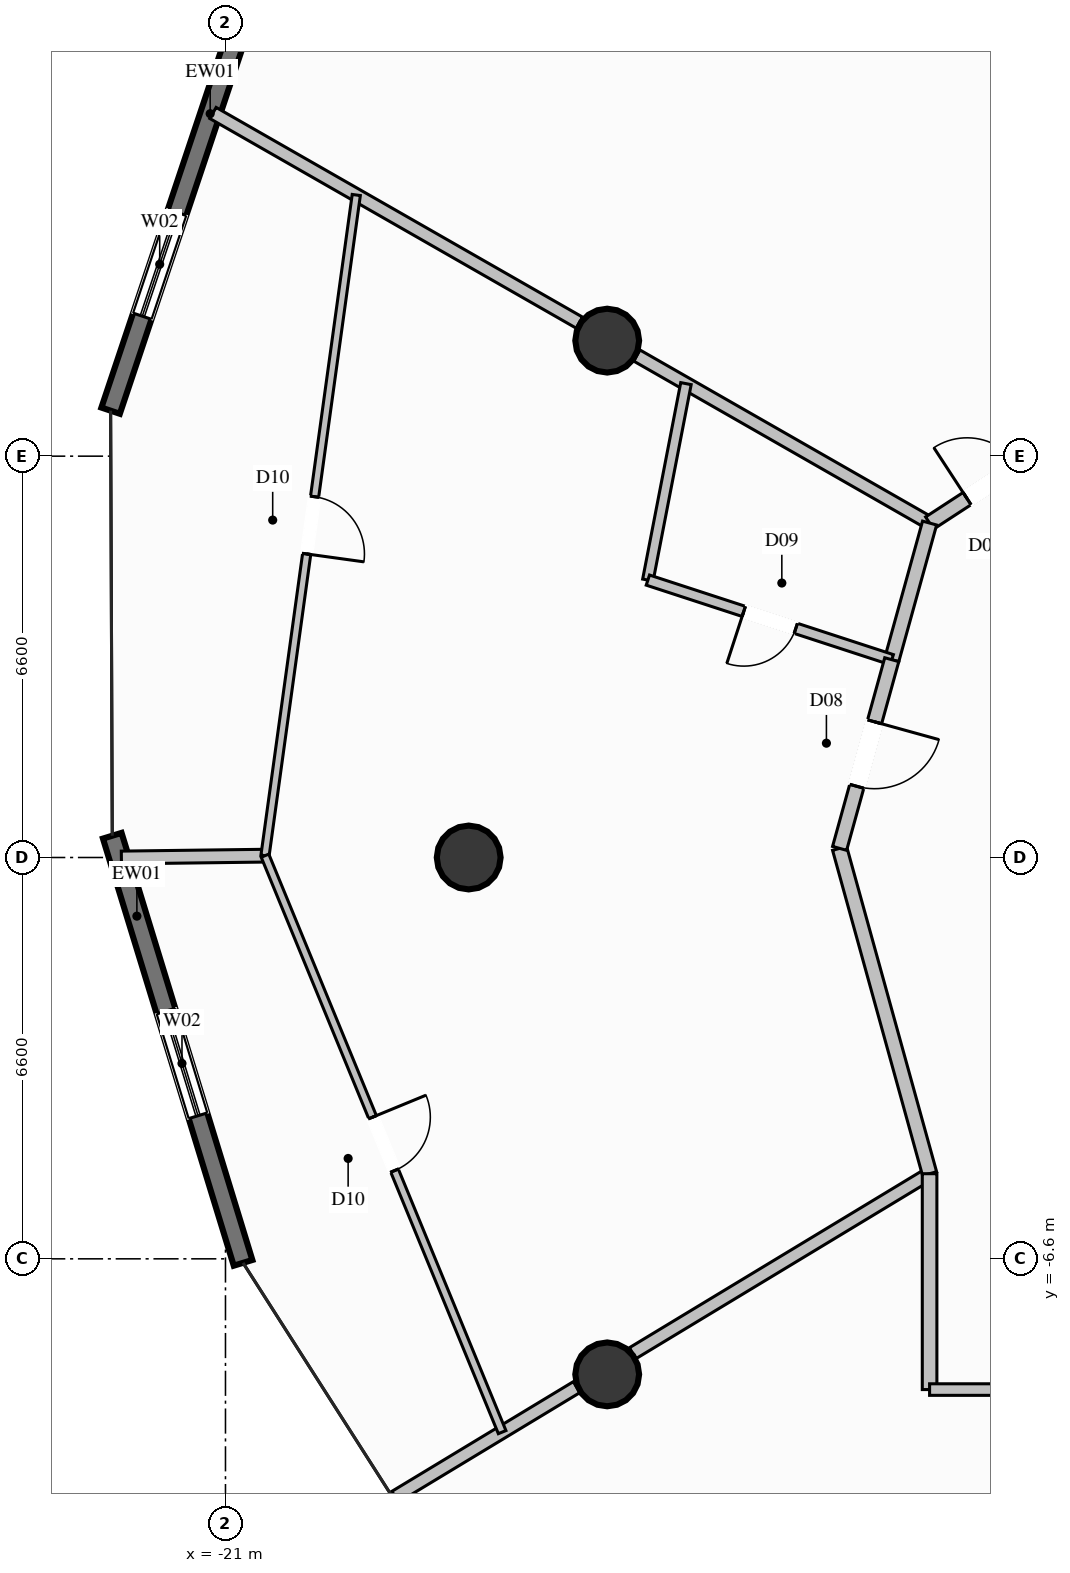
"""IFC4 building model, lengths in metres.
Left out: names, types, materials, properties, quantities, classifications, styles, units other than length and angle.
Written with IfcOpenShell. Run it as: python <this file> out.ifc"""

import sys

from ifc_helpers import new_model, si_unit, direction, frame, frame_2d, origin, origin_2d, place, context, subcontext, project, spatial, rectangle, circle, extrude, element, fill, save


model = new_model("IFC4")
c1 = context("Model", 3, precision=1e-05, world=origin(), true_north=direction((0.0, 1.0)))
c2 = subcontext(c1, "Body", "Model", "MODEL_VIEW")
j1 = project(units=[si_unit("LENGTHUNIT", "METRE"), si_unit("PLANEANGLEUNIT", "RADIAN")], contexts=[c1])
p1 = place(None, origin())
s1 = spatial("IfcSite", under=j1, at=p1, CompositionType="ELEMENT")
p2 = place(p1, origin())
s2 = spatial("IfcBuilding", under=s1, at=p2, CompositionType="ELEMENT")
p3 = place(p2, frame((0.0, 0.0, 160.2)))
s3 = spatial("IfcBuildingStorey", under=s2, at=p3, CompositionType="ELEMENT", Elevation=160.2)
for number, where, z_axis, x_axis in (
    (1, (-14.722, 8.5, 0.0), (0.0, 0.0, 1.0), (1.0, 0.0, 0.0)),
    (2, (-17.0, 0.0, 0.0), (0.0, 0.0, 1.0), (1.0, 0.0, 0.0)),
    (3, (-14.722, -8.5, 0.0), (0.0, 0.0, 1.0), (1.0, 0.0, 0.0)),
):
    element("IfcColumn", number, at=place(p3, frame(where, z_axis=z_axis, x_axis=x_axis)), inside=s3, PredefinedType="COLUMN", context=c2, shape_type="SweptSolid", body=[
        extrude(circle(Radius=0.525, at=origin_2d()), origin(), (0.0, 0.0, 1.0), 3.6),
    ])
p4 = place(p3, frame((-22.889, 7.348, 0.0), z_axis=(0.0, 0.0, 1.0), x_axis=(0.317833277316, 0.948146617265, 0.0)))
e4 = element("IfcWall", 4, at=p4, inside=s3, PredefinedType="SOLIDWALL", context=c2, shape_type="SweptSolid", body=[
    extrude(rectangle(XDim=6.613, YDim=0.32, at=frame_2d((3.307, 0.0))), origin(), (0.0, 0.0, 1.0), 3.2),
])
p5 = place(p4, frame((1.639, 0.0, 0.35)))
e5 = element("IfcOpeningElement", 5, at=p5, cuts=e4, PredefinedType="OPENING", context=c2, shape_type="SweptSolid", body=[
    extrude(rectangle(XDim=1.8, YDim=2.6, at=frame_2d((0.9, 1.3))), frame((0.0, 0.17, 0.0), z_axis=(0.0, -1.0, 0.0), x_axis=(1.0, 0.0, 0.0)), (0.0, 0.0, 1.0), 0.34),
])
p6 = place(p3, frame((-20.711, -6.666, 0.0), z_axis=(0.0, 0.0, 1.0), x_axis=(-0.292831477481, 0.956164068451, 0.0)))
e6 = element("IfcWall", 6, at=p6, inside=s3, PredefinedType="SOLIDWALL", context=c2, shape_type="SweptSolid", body=[
    extrude(rectangle(XDim=7.346, YDim=0.32, at=frame_2d((3.673, 0.0))), origin(), (0.0, 0.0, 1.0), 3.2),
])
p7 = place(p6, frame((2.53, 0.0, 0.35)))
e7 = element("IfcOpeningElement", 7, at=p7, cuts=e6, PredefinedType="OPENING", context=c2, shape_type="SweptSolid", body=[
    extrude(rectangle(XDim=1.8, YDim=2.6, at=frame_2d((0.9, 1.3))), frame((0.0, 0.17, 0.0), z_axis=(0.0, -1.0, 0.0), x_axis=(1.0, 0.0, 0.0)), (0.0, 0.0, 1.0), 0.34),
])
p8 = place(p3, frame((-9.42, 5.5, 0.0), z_axis=(0.0, 0.0, 1.0), x_axis=(-0.867983033222, 0.496593852197, 0.0)))
e8 = element("IfcWall", 8, at=p8, inside=s3, PredefinedType="PARTITIONING", context=c2, shape_type="SweptSolid", body=[
    extrude(rectangle(XDim=5.548, YDim=0.21, at=frame_2d((2.774, 0.0))), origin(), (0.0, 0.0, 1.0), 2.067),
])
p9 = place(p3, frame((-15.18, 8.796, 0.0), z_axis=(0.0, 0.0, 1.0), x_axis=(-0.867963853145, 0.496627375034, 0.0)))
e9 = element("IfcWall", 9, at=p9, inside=s3, PredefinedType="PARTITIONING", context=c2, shape_type="SweptSolid", body=[
    extrude(rectangle(XDim=6.943, YDim=0.21, at=frame_2d((3.471, 0.0))), origin(), (0.0, 0.0, 1.0), 3.2),
])
p10 = place(p3, frame((-9.42, -5.2, 0.0), z_axis=(0.0, 0.0, 1.0), x_axis=(-0.855762821872, -0.517368333687, 0.0)))
e10 = element("IfcWall", 10, at=p10, inside=s3, PredefinedType="PARTITIONING", context=c2, shape_type="SweptSolid", body=[
    extrude(rectangle(XDim=5.706, YDim=0.21, at=frame_2d((2.853, 0.0))), origin(), (0.0, 0.0, 1.0), 2.067),
])
p11 = place(p3, frame((-15.225, -8.71, 0.0), z_axis=(0.0, 0.0, 1.0), x_axis=(-0.855813475179, -0.517284540366, 0.0)))
e11 = element("IfcWall", 11, at=p11, inside=s3, PredefinedType="PARTITIONING", context=c2, shape_type="SweptSolid", body=[
    extrude(rectangle(XDim=3.485, YDim=0.21, at=frame_2d((1.743, 0.0))), origin(), (0.0, 0.0, 1.0), 3.2),
])
p12 = place(p3, frame((-9.42, 5.5, 0.0), z_axis=(0.0, 0.0, 1.0), x_axis=(0.837571286912, 0.546328051029, 0.0)))
e12 = element("IfcWall", 12, at=p12, inside=s3, PredefinedType="PARTITIONING", context=c2, shape_type="SweptSolid", body=[
    extrude(rectangle(XDim=2.471, YDim=0.24, at=frame_2d((1.236, 0.0))), origin(), (0.0, 0.0, 1.0), 3.2),
])
p13 = place(p12, frame((0.736, 0.0, 0.0)))
e13 = element("IfcOpeningElement", 13, at=p13, cuts=e12, PredefinedType="OPENING", context=c2, shape_type="SweptSolid", body=[
    extrude(rectangle(XDim=1.0, YDim=2.2, at=frame_2d((0.5, 1.1))), frame((0.0, 0.13, 0.0), z_axis=(0.0, -1.0, 0.0), x_axis=(1.0, 0.0, 0.0)), (0.0, 0.0, 1.0), 0.26),
])
p14 = place(p3, frame((-9.42, 5.5, 0.0), z_axis=(0.0, 0.0, 1.0), x_axis=(-0.266801280383, -0.963751563831, 0.0)))
e14 = element("IfcWall", 14, at=p14, inside=s3, PredefinedType="PARTITIONING", context=c2, shape_type="SweptSolid", body=[
    extrude(rectangle(XDim=2.332, YDim=0.24, at=frame_2d((1.166, 0.0))), origin(), (0.0, 0.0, 1.0), 3.2),
])
p15 = place(p3, frame((-13.427, 7.793, 0.0), z_axis=(0.0, 0.0, 1.0), x_axis=(-0.190206431815, -0.981744118035, 0.0)))
e15 = element("IfcWall", 15, at=p15, inside=s3, PredefinedType="PLUMBINGWALL", context=c2, shape_type="SweptSolid", body=[
    extrude(rectangle(XDim=3.291, YDim=0.175, at=frame_2d((1.646, 0.0))), origin(), (0.0, 0.0, 1.0), 3.2),
])
p16 = place(p3, frame((-10.042, 3.253, 0.0), z_axis=(0.0, 0.0, 1.0), x_axis=(-0.950649351397, 0.310267321334, 0.0)))
e16 = element("IfcWall", 16, at=p16, inside=s3, PredefinedType="PLUMBINGWALL", context=c2, shape_type="SweptSolid", body=[
    extrude(rectangle(XDim=4.219, YDim=0.175, at=frame_2d((2.11, 0.0))), origin(), (0.0, 0.0, 1.0), 3.2),
])
p17 = place(p16, frame((1.66, 0.0, 0.0)))
e17 = element("IfcOpeningElement", 17, at=p17, cuts=e16, PredefinedType="OPENING", context=c2, shape_type="SweptSolid", body=[
    extrude(rectangle(XDim=0.9, YDim=2.1, at=frame_2d((0.45, 1.05))), frame((0.0, 0.098, 0.0), z_axis=(0.0, -1.0, 0.0), x_axis=(1.0, 0.0, 0.0)), (0.0, 0.0, 1.0), 0.195),
])
p18 = place(p3, frame((-20.35, 0.03, 0.0), z_axis=(0.0, 0.0, 1.0), x_axis=(-0.99991918064, -0.012713464877, 0.0)))
e18 = element("IfcWall", 18, at=p18, inside=s3, PredefinedType="PARTITIONING", context=c2, shape_type="SweptSolid", body=[
    extrude(rectangle(XDim=2.362, YDim=0.21, at=frame_2d((1.181, 0.0))), origin(), (0.0, 0.0, 1.0), 3.2),
])
p19 = place(p3, frame((-10.9, 0.15, 0.0), z_axis=(0.0, 0.0, 1.0), x_axis=(0.266625172958, -0.963800299411, 0.0)))
e19 = element("IfcWall", 19, at=p19, inside=s3, PredefinedType="PARTITIONING", context=c2, shape_type="SweptSolid", body=[
    extrude(rectangle(XDim=5.551, YDim=0.24, at=frame_2d((2.775, 0.0))), origin(), (0.0, 0.0, 1.0), 3.2),
])
p20 = place(p3, frame((-10.042, 3.253, 0.0), z_axis=(0.0, 0.0, 1.0), x_axis=(-0.266478138733, -0.963840962803, 0.0)))
e20 = element("IfcWall", 20, at=p20, inside=s3, PredefinedType="PARTITIONING", context=c2, shape_type="SweptSolid", body=[
    extrude(rectangle(XDim=3.219, YDim=0.24, at=frame_2d((1.61, 0.0))), origin(), (0.0, 0.0, 1.0), 3.2),
])
p21 = place(p20, frame((1.06, 0.0, 0.0)))
e21 = element("IfcOpeningElement", 21, at=p21, cuts=e20, PredefinedType="OPENING", context=c2, shape_type="SweptSolid", body=[
    extrude(rectangle(XDim=1.1, YDim=2.3, at=frame_2d((0.55, 1.15))), frame((0.0, 0.13, 0.0), z_axis=(0.0, -1.0, 0.0), x_axis=(1.0, 0.0, 0.0)), (0.0, 0.0, 1.0), 0.26),
])
p22 = place(p3, frame((-18.849, 10.895, 0.0), z_axis=(0.0, 0.0, 1.0), x_axis=(-0.136848296062, -0.990592016859, 0.0)))
e22 = element("IfcWall", 22, at=p22, inside=s3, PredefinedType="PARTITIONING", context=c2, shape_type="SweptSolid", body=[
    extrude(rectangle(XDim=10.968, YDim=0.135, at=frame_2d((5.484, 0.0))), origin(), (0.0, 0.0, 1.0), 3.2),
])
p23 = place(p22, frame((5.009, 0.0, 0.0)))
e23 = element("IfcOpeningElement", 23, at=p23, cuts=e22, PredefinedType="OPENING", context=c2, shape_type="SweptSolid", body=[
    extrude(rectangle(XDim=0.95, YDim=2.1, at=frame_2d((0.475, 1.05))), frame((0.0, 0.078, 0.0), z_axis=(0.0, -1.0, 0.0), x_axis=(1.0, 0.0, 0.0)), (0.0, 0.0, 1.0), 0.155),
])
p24 = place(p3, frame((-20.35, 0.03, 0.0), z_axis=(0.0, 0.0, 1.0), x_axis=(0.380468288076, -0.924793967199, 0.0)))
e24 = element("IfcWall", 24, at=p24, inside=s3, PredefinedType="PARTITIONING", context=c2, shape_type="SweptSolid", body=[
    extrude(rectangle(XDim=10.251, YDim=0.135, at=frame_2d((5.125, 0.0))), origin(), (0.0, 0.0, 1.0), 3.2),
])
p25 = place(p24, frame((4.65, 0.0, 0.0)))
e25 = element("IfcOpeningElement", 25, at=p25, cuts=e24, PredefinedType="OPENING", context=c2, shape_type="SweptSolid", body=[
    extrude(rectangle(XDim=0.95, YDim=2.1, at=frame_2d((0.475, 1.05))), frame((0.0, 0.078, 0.0), z_axis=(0.0, -1.0, 0.0), x_axis=(1.0, 0.0, 0.0)), (0.0, 0.0, 1.0), 0.155),
])
p26 = place(p3, frame((-5.181, -8.75, 0.0), z_axis=(0.0, 0.0, 1.0), x_axis=(-0.308017807396, -0.951380591733, 0.0)))
e26 = element("IfcWall", 26, at=p26, inside=s3, PredefinedType="PARTITIONING", context=c2, shape_type="SweptSolid", body=[
    extrude(rectangle(XDim=11.123, YDim=0.21, at=frame_2d((5.562, 0.0))), origin(), (0.0, 0.0, 1.0), 2.067),
])
p27 = place(p3, frame((-9.42, -5.2, 0.0), z_axis=(0.0, 0.0, 1.0), x_axis=(0.0, -1.0, 0.0)))
e27 = element("IfcWall", 27, at=p27, inside=s3, PredefinedType="PARTITIONING", context=c2, shape_type="SweptSolid", body=[
    extrude(rectangle(XDim=3.55, YDim=0.24, at=frame_2d((1.775, 0.0))), origin(), (0.0, 0.0, 1.0), 3.2),
])
p28 = place(p3, frame((-9.42, -8.75, 0.0), z_axis=(0.0, 0.0, 1.0), x_axis=(1.0, 0.0, 0.0)))
e28 = element("IfcWall", 28, at=p28, inside=s3, PredefinedType="PARTITIONING", context=c2, shape_type="SweptSolid", body=[
    extrude(rectangle(XDim=4.239, YDim=0.19, at=frame_2d((2.12, 0.0))), origin(), (0.0, 0.0, 1.0), 3.2),
])
p29 = place(p28, frame((1.644, 0.0, 0.0)))
e29 = element("IfcOpeningElement", 29, at=p29, cuts=e28, PredefinedType="OPENING", context=c2, shape_type="SweptSolid", body=[
    extrude(rectangle(XDim=0.95, YDim=2.1, at=frame_2d((0.475, 1.05))), frame((0.0, 0.105, 0.0), z_axis=(0.0, -1.0, 0.0), x_axis=(1.0, 0.0, 0.0)), (0.0, 0.0, 1.0), 0.21),
])
p30 = place(p5, origin())
e30 = element("IfcWindow", 30, at=p30, inside=s3, PartitioningType="SINGLE_PANEL", PredefinedType="WINDOW", context=c2, shape_type="SweptSolid", body=[
    extrude(rectangle(XDim=1.8, YDim=2.6, at=frame_2d((0.9, 1.3))), frame((0.0, 0.03, 0.0), z_axis=(0.0, -1.0, 0.0), x_axis=(1.0, 0.0, 0.0)), (0.0, 0.0, 1.0), 0.06),
])
fill(e5, e30)
p31 = place(p7, origin())
e31 = element("IfcWindow", 31, at=p31, inside=s3, PartitioningType="SINGLE_PANEL", PredefinedType="WINDOW", context=c2, shape_type="SweptSolid", body=[
    extrude(rectangle(XDim=1.8, YDim=2.6, at=frame_2d((0.9, 1.3))), frame((0.0, 0.03, 0.0), z_axis=(0.0, -1.0, 0.0), x_axis=(1.0, 0.0, 0.0)), (0.0, 0.0, 1.0), 0.06),
])
fill(e7, e31)
p32 = place(p13, origin())
e32 = element("IfcDoor", 32, at=p32, inside=s3, OperationType="SINGLE_SWING_LEFT", PredefinedType="DOOR", context=c2, shape_type="SweptSolid", body=[
    extrude(rectangle(XDim=1.0, YDim=2.2, at=frame_2d((0.5, 1.1))), frame((0.0, 0.025, 0.0), z_axis=(0.0, -1.0, 0.0), x_axis=(1.0, 0.0, 0.0)), (0.0, 0.0, 1.0), 0.05),
])
fill(e13, e32)
p33 = place(p17, origin())
e33 = element("IfcDoor", 33, at=p33, inside=s3, OperationType="SINGLE_SWING_RIGHT", PredefinedType="DOOR", context=c2, shape_type="SweptSolid", body=[
    extrude(rectangle(XDim=0.9, YDim=2.1, at=frame_2d((0.45, 1.05))), frame((0.0, 0.025, 0.0), z_axis=(0.0, -1.0, 0.0), x_axis=(1.0, 0.0, 0.0)), (0.0, 0.0, 1.0), 0.05),
])
fill(e17, e33)
p34 = place(p21, origin())
e34 = element("IfcDoor", 34, at=p34, inside=s3, OperationType="SINGLE_SWING_LEFT", PredefinedType="DOOR", context=c2, shape_type="SweptSolid", body=[
    extrude(rectangle(XDim=1.1, YDim=2.3, at=frame_2d((0.55, 1.15))), frame((0.0, 0.025, 0.0), z_axis=(0.0, -1.0, 0.0), x_axis=(1.0, 0.0, 0.0)), (0.0, 0.0, 1.0), 0.05),
])
fill(e21, e34)
p35 = place(p23, origin())
e35 = element("IfcDoor", 35, at=p35, inside=s3, OperationType="SINGLE_SWING_RIGHT", PredefinedType="DOOR", context=c2, shape_type="SweptSolid", body=[
    extrude(rectangle(XDim=0.95, YDim=2.1, at=frame_2d((0.475, 1.05))), frame((0.0, 0.025, 0.0), z_axis=(0.0, -1.0, 0.0), x_axis=(1.0, 0.0, 0.0)), (0.0, 0.0, 1.0), 0.05),
])
fill(e23, e35)
p36 = place(p25, origin())
e36 = element("IfcDoor", 36, at=p36, inside=s3, OperationType="SINGLE_SWING_LEFT", PredefinedType="DOOR", context=c2, shape_type="SweptSolid", body=[
    extrude(rectangle(XDim=0.95, YDim=2.1, at=frame_2d((0.475, 1.05))), frame((0.0, 0.025, 0.0), z_axis=(0.0, -1.0, 0.0), x_axis=(1.0, 0.0, 0.0)), (0.0, 0.0, 1.0), 0.05),
])
fill(e25, e36)
save(model, sys.argv[1])
